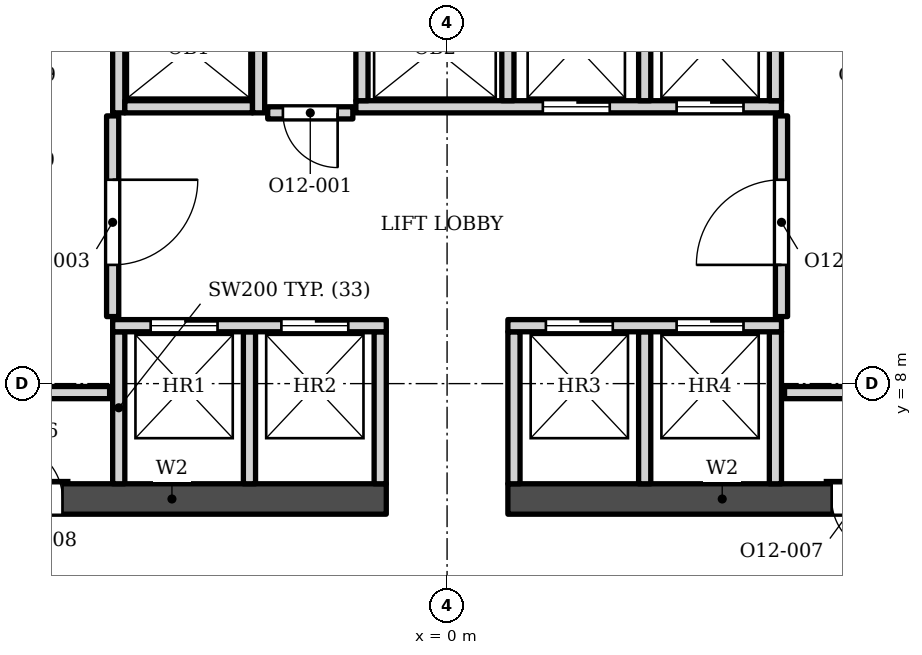
"""IFC4 building model, lengths in metres.
Left out: names, types, materials, properties, quantities, classifications, styles, units other than length and angle.
Written with IfcOpenShell. Run it as: python <this file> out.ifc"""

import sys

from ifc_helpers import new_model, si_unit, direction, frame, frame_2d, origin, place, context, subcontext, project, spatial, rectangle, extrude, element, fill, save


model = new_model("IFC4")
c1 = context("Model", 3, precision=1e-05, world=origin(), true_north=direction((0.0, 1.0)))
c2 = subcontext(c1, "Body", "Model", "MODEL_VIEW")
j1 = project(units=[si_unit("LENGTHUNIT", "METRE"), si_unit("PLANEANGLEUNIT", "RADIAN")], contexts=[c1])
p1 = place(None, origin())
s1 = spatial("IfcSite", under=j1, at=p1, CompositionType="ELEMENT")
p2 = place(p1, origin())
s2 = spatial("IfcBuilding", under=s1, at=p2, CompositionType="ELEMENT")
p3 = place(p2, frame((0.0, 0.0, 279.4)))
s3 = spatial("IfcBuildingStorey", under=s2, at=p3, CompositionType="ELEMENT", Elevation=279.4)
p4 = place(p3, frame((-8.05, 6.103, 0.0), z_axis=(0.0, 0.0, 1.0), x_axis=(1.0, 0.0, 0.0)))
e1 = element("IfcWall", 1, at=p4, inside=s3, PredefinedType="SHEAR", context=c2, shape_type="SweptSolid", body=[
    extrude(rectangle(XDim=7.05, YDim=0.5, at=frame_2d((3.525, 0.0))), origin(), (0.0, 0.0, 1.0), 3.9),
])
p5 = place(p4, frame((0.825, 0.0, 0.0)))
e2 = element("IfcOpeningElement", 2, at=p5, cuts=e1, PredefinedType="OPENING", context=c2, shape_type="SweptSolid", body=[
    extrude(rectangle(XDim=0.9, YDim=2.1, at=frame_2d((0.45, 1.05))), frame((0.0, 0.26, 0.0), z_axis=(0.0, -1.0, 0.0), x_axis=(1.0, 0.0, 0.0)), (0.0, 0.0, 1.0), 0.52),
])
p6 = place(p3, frame((1.0, 6.103, 0.0), z_axis=(0.0, 0.0, 1.0), x_axis=(1.0, 0.0, 0.0)))
e3 = element("IfcWall", 3, at=p6, inside=s3, PredefinedType="SHEAR", context=c2, shape_type="SweptSolid", body=[
    extrude(rectangle(XDim=7.05, YDim=0.5, at=frame_2d((3.525, 0.0))), origin(), (0.0, 0.0, 1.0), 3.9),
])
p7 = place(p6, frame((5.325, 0.0, 0.0)))
e4 = element("IfcOpeningElement", 4, at=p7, cuts=e3, PredefinedType="OPENING", context=c2, shape_type="SweptSolid", body=[
    extrude(rectangle(XDim=0.9, YDim=2.1, at=frame_2d((0.45, 1.05))), frame((0.0, 0.26, 0.0), z_axis=(0.0, -1.0, 0.0), x_axis=(1.0, 0.0, 0.0)), (0.0, 0.0, 1.0), 0.52),
])
for number, where, z_axis, x_axis in (
    (5, (-5.4, 6.353, 0.0), (0.0, 0.0, 1.0), (0.0, 1.0, 0.0)),
    (6, (-3.25, 6.353, 0.0), (0.0, 0.0, 1.0), (0.0, 1.0, 0.0)),
    (7, (-1.1, 6.353, 0.0), (0.0, 0.0, 1.0), (0.0, 1.0, 0.0)),
    (8, (1.1, 6.353, 0.0), (0.0, 0.0, 1.0), (0.0, 1.0, 0.0)),
    (9, (3.25, 6.353, 0.0), (0.0, 0.0, 1.0), (0.0, 1.0, 0.0)),
    (10, (5.4, 6.353, 0.0), (0.0, 0.0, 1.0), (0.0, 1.0, 0.0)),
    (11, (-8.05, 7.853, 0.0), (0.0, 0.0, 1.0), (1.0, 0.0, 0.0)),
    (12, (5.55, 7.853, 0.0), (0.0, 0.0, 1.0), (1.0, 0.0, 0.0)),
):
    element("IfcWall", number, at=place(p3, frame(where, z_axis=z_axis, x_axis=x_axis)), inside=s3, PredefinedType="SOLIDWALL", context=c2, shape_type="SweptSolid", body=[
        extrude(rectangle(XDim=2.5, YDim=0.2, at=frame_2d((1.25, 0.0))), origin(), (0.0, 0.0, 1.0), 3.73),
    ])
p8 = place(p3, frame((-5.5, 8.953, 0.0), z_axis=(0.0, 0.0, 1.0), x_axis=(1.0, 0.0, 0.0)))
e13 = element("IfcWall", 13, at=p8, inside=s3, PredefinedType="SOLIDWALL", context=c2, shape_type="SweptSolid", body=[
    extrude(rectangle(XDim=4.5, YDim=0.2, at=frame_2d((2.25, 0.0))), origin(), (0.0, 0.0, 1.0), 3.73),
])
p9 = place(p8, frame((0.625, 0.0, 0.0)))
e14 = element("IfcOpeningElement", 14, at=p9, cuts=e13, PredefinedType="OPENING", context=c2, shape_type="SweptSolid", body=[
    extrude(rectangle(XDim=1.1, YDim=2.1, at=frame_2d((0.55, 1.05))), frame((0.0, 0.11, 0.0), z_axis=(0.0, -1.0, 0.0), x_axis=(1.0, 0.0, 0.0)), (0.0, 0.0, 1.0), 0.22),
])
p10 = place(p8, frame((2.775, 0.0, 0.0)))
e15 = element("IfcOpeningElement", 15, at=p10, cuts=e13, PredefinedType="OPENING", context=c2, shape_type="SweptSolid", body=[
    extrude(rectangle(XDim=1.1, YDim=2.1, at=frame_2d((0.55, 1.05))), frame((0.0, 0.11, 0.0), z_axis=(0.0, -1.0, 0.0), x_axis=(1.0, 0.0, 0.0)), (0.0, 0.0, 1.0), 0.22),
])
p11 = place(p3, frame((1.0, 8.953, 0.0), z_axis=(0.0, 0.0, 1.0), x_axis=(1.0, 0.0, 0.0)))
e16 = element("IfcWall", 16, at=p11, inside=s3, PredefinedType="SOLIDWALL", context=c2, shape_type="SweptSolid", body=[
    extrude(rectangle(XDim=4.5, YDim=0.2, at=frame_2d((2.25, 0.0))), origin(), (0.0, 0.0, 1.0), 3.73),
])
p12 = place(p11, frame((0.625, 0.0, 0.0)))
e17 = element("IfcOpeningElement", 17, at=p12, cuts=e16, PredefinedType="OPENING", context=c2, shape_type="SweptSolid", body=[
    extrude(rectangle(XDim=1.1, YDim=2.1, at=frame_2d((0.55, 1.05))), frame((0.0, 0.11, 0.0), z_axis=(0.0, -1.0, 0.0), x_axis=(1.0, 0.0, 0.0)), (0.0, 0.0, 1.0), 0.22),
])
p13 = place(p11, frame((2.775, 0.0, 0.0)))
e18 = element("IfcOpeningElement", 18, at=p13, cuts=e16, PredefinedType="OPENING", context=c2, shape_type="SweptSolid", body=[
    extrude(rectangle(XDim=1.1, YDim=2.1, at=frame_2d((0.55, 1.05))), frame((0.0, 0.11, 0.0), z_axis=(0.0, -1.0, 0.0), x_axis=(1.0, 0.0, 0.0)), (0.0, 0.0, 1.0), 0.22),
])
p14 = place(p3, frame((-5.5, 9.103, 0.0), z_axis=(0.0, 0.0, 1.0), x_axis=(0.0, 1.0, 0.0)))
e19 = element("IfcWall", 19, at=p14, inside=s3, PredefinedType="SOLIDWALL", context=c2, shape_type="SweptSolid", body=[
    extrude(rectangle(XDim=3.3, YDim=0.2, at=frame_2d((1.65, 0.0))), origin(), (0.0, 0.0, 1.0), 3.73),
])
p15 = place(p14, frame((0.85, 0.0, 0.0)))
e20 = element("IfcOpeningElement", 20, at=p15, cuts=e19, PredefinedType="OPENING", context=c2, shape_type="SweptSolid", body=[
    extrude(rectangle(XDim=1.4, YDim=2.1, at=frame_2d((0.7, 1.05))), frame((0.0, 0.11, 0.0), z_axis=(0.0, -1.0, 0.0), x_axis=(1.0, 0.0, 0.0)), (0.0, 0.0, 1.0), 0.22),
])
p16 = place(p3, frame((5.5, 9.103, 0.0), z_axis=(0.0, 0.0, 1.0), x_axis=(0.0, 1.0, 0.0)))
e21 = element("IfcWall", 21, at=p16, inside=s3, PredefinedType="SOLIDWALL", context=c2, shape_type="SweptSolid", body=[
    extrude(rectangle(XDim=3.3, YDim=0.2, at=frame_2d((1.65, 0.0))), origin(), (0.0, 0.0, 1.0), 3.73),
])
p17 = place(p16, frame((0.85, 0.0, 0.0)))
e22 = element("IfcOpeningElement", 22, at=p17, cuts=e21, PredefinedType="OPENING", context=c2, shape_type="SweptSolid", body=[
    extrude(rectangle(XDim=1.4, YDim=2.1, at=frame_2d((0.7, 1.05))), frame((0.0, 0.11, 0.0), z_axis=(0.0, -1.0, 0.0), x_axis=(1.0, 0.0, 0.0)), (0.0, 0.0, 1.0), 0.22),
])
p18 = place(p3, frame((-2.95, 12.453, 0.0), z_axis=(0.0, 0.0, 1.0), x_axis=(1.0, 0.0, 0.0)))
e23 = element("IfcWall", 23, at=p18, inside=s3, PredefinedType="SOLIDWALL", context=c2, shape_type="SweptSolid", body=[
    extrude(rectangle(XDim=1.4, YDim=0.2, at=frame_2d((0.7, 0.0))), origin(), (0.0, 0.0, 1.0), 3.73),
])
p19 = place(p18, frame((0.25, 0.0, 0.0)))
e24 = element("IfcOpeningElement", 24, at=p19, cuts=e23, PredefinedType="OPENING", context=c2, shape_type="SweptSolid", body=[
    extrude(rectangle(XDim=0.9, YDim=2.1, at=frame_2d((0.45, 1.05))), frame((0.0, 0.11, 0.0), z_axis=(0.0, -1.0, 0.0), x_axis=(1.0, 0.0, 0.0)), (0.0, 0.0, 1.0), 0.22),
])
p20 = place(p3, frame((-5.4, 12.453, 0.0), z_axis=(0.0, 0.0, 1.0), x_axis=(0.0, 1.0, 0.0)))
e25 = element("IfcWall", 25, at=p20, inside=s3, PredefinedType="SOLIDWALL", context=c2, shape_type="SweptSolid", body=[
    extrude(rectangle(XDim=3.0, YDim=0.2, at=frame_2d((1.5, 0.0))), origin(), (0.0, 0.0, 1.0), 3.73),
])
p21 = place(p3, frame((-5.3, 12.552, 0.0), z_axis=(0.0, 0.0, 1.0), x_axis=(1.0, 0.0, 0.0)))
e26 = element("IfcWall", 26, at=p21, inside=s3, PredefinedType="SOLIDWALL", context=c2, shape_type="SweptSolid", body=[
    extrude(rectangle(XDim=2.1, YDim=0.2, at=frame_2d((1.05, 0.0))), origin(), (0.0, 0.0, 1.0), 3.73),
])
p22 = place(p3, frame((-3.1, 12.453, 0.0), z_axis=(0.0, 0.0, 1.0), x_axis=(0.0, 1.0, 0.0)))
e27 = element("IfcWall", 27, at=p22, inside=s3, PredefinedType="SOLIDWALL", context=c2, shape_type="SweptSolid", body=[
    extrude(rectangle(XDim=3.0, YDim=0.2, at=frame_2d((1.5, 0.0))), origin(), (0.0, 0.0, 1.0), 3.73),
])
p23 = place(p3, frame((-1.5, 12.552, 0.0), z_axis=(0.0, 0.0, 1.0), x_axis=(1.0, 0.0, 0.0)))
e28 = element("IfcWall", 28, at=p23, inside=s3, PredefinedType="SOLIDWALL", context=c2, shape_type="SweptSolid", body=[
    extrude(rectangle(XDim=7.0, YDim=0.2, at=frame_2d((3.5, 0.0))), origin(), (0.0, 0.0, 1.0), 3.73),
])
p24 = place(p23, frame((3.075, 0.0, 0.0)))
e29 = element("IfcOpeningElement", 29, at=p24, cuts=e28, PredefinedType="OPENING", context=c2, shape_type="SweptSolid", body=[
    extrude(rectangle(XDim=1.1, YDim=2.1, at=frame_2d((0.55, 1.05))), frame((0.0, 0.11, 0.0), z_axis=(0.0, -1.0, 0.0), x_axis=(1.0, 0.0, 0.0)), (0.0, 0.0, 1.0), 0.22),
])
p25 = place(p23, frame((5.275, 0.0, 0.0)))
e30 = element("IfcOpeningElement", 30, at=p25, cuts=e28, PredefinedType="OPENING", context=c2, shape_type="SweptSolid", body=[
    extrude(rectangle(XDim=1.1, YDim=2.1, at=frame_2d((0.55, 1.05))), frame((0.0, 0.11, 0.0), z_axis=(0.0, -1.0, 0.0), x_axis=(1.0, 0.0, 0.0)), (0.0, 0.0, 1.0), 0.22),
])
for number, where, z_axis, x_axis in (
    (31, (-1.4, 12.653, 0.0), (0.0, 0.0, 1.0), (0.0, 1.0, 0.0)),
    (32, (1.0, 12.653, 0.0), (0.0, 0.0, 1.0), (0.0, 1.0, 0.0)),
    (33, (3.25, 12.653, 0.0), (0.0, 0.0, 1.0), (0.0, 1.0, 0.0)),
):
    element("IfcWall", number, at=place(p3, frame(where, z_axis=z_axis, x_axis=x_axis)), inside=s3, PredefinedType="SOLIDWALL", context=c2, shape_type="SweptSolid", body=[
        extrude(rectangle(XDim=2.6, YDim=0.2, at=frame_2d((1.3, 0.0))), origin(), (0.0, 0.0, 1.0), 3.73),
    ])
p26 = place(p3, frame((5.4, 12.653, 0.0), z_axis=(0.0, 0.0, 1.0), x_axis=(0.0, 1.0, 0.0)))
e34 = element("IfcWall", 34, at=p26, inside=s3, PredefinedType="SOLIDWALL", context=c2, shape_type="SweptSolid", body=[
    extrude(rectangle(XDim=1.6, YDim=0.2, at=frame_2d((0.8, 0.0))), origin(), (0.0, 0.0, 1.0), 3.73),
])
p27 = place(p9, origin())
e35 = element("IfcDoor", 35, at=p27, inside=s3, OperationType="DOUBLE_DOOR_SLIDING", PredefinedType="DOOR", context=c2, shape_type="SweptSolid", body=[
    extrude(rectangle(XDim=1.1, YDim=2.1, at=frame_2d((0.55, 1.05))), frame((0.0, 0.025, 0.0), z_axis=(0.0, -1.0, 0.0), x_axis=(1.0, 0.0, 0.0)), (0.0, 0.0, 1.0), 0.05),
])
fill(e14, e35)
p28 = place(p10, origin())
e36 = element("IfcDoor", 36, at=p28, inside=s3, OperationType="DOUBLE_DOOR_SLIDING", PredefinedType="DOOR", context=c2, shape_type="SweptSolid", body=[
    extrude(rectangle(XDim=1.1, YDim=2.1, at=frame_2d((0.55, 1.05))), frame((0.0, 0.025, 0.0), z_axis=(0.0, -1.0, 0.0), x_axis=(1.0, 0.0, 0.0)), (0.0, 0.0, 1.0), 0.05),
])
fill(e15, e36)
p29 = place(p12, origin())
e37 = element("IfcDoor", 37, at=p29, inside=s3, OperationType="DOUBLE_DOOR_SLIDING", PredefinedType="DOOR", context=c2, shape_type="SweptSolid", body=[
    extrude(rectangle(XDim=1.1, YDim=2.1, at=frame_2d((0.55, 1.05))), frame((0.0, 0.025, 0.0), z_axis=(0.0, -1.0, 0.0), x_axis=(1.0, 0.0, 0.0)), (0.0, 0.0, 1.0), 0.05),
])
fill(e17, e37)
p30 = place(p13, origin())
e38 = element("IfcDoor", 38, at=p30, inside=s3, OperationType="DOUBLE_DOOR_SLIDING", PredefinedType="DOOR", context=c2, shape_type="SweptSolid", body=[
    extrude(rectangle(XDim=1.1, YDim=2.1, at=frame_2d((0.55, 1.05))), frame((0.0, 0.025, 0.0), z_axis=(0.0, -1.0, 0.0), x_axis=(1.0, 0.0, 0.0)), (0.0, 0.0, 1.0), 0.05),
])
fill(e18, e38)
p31 = place(p24, origin())
e39 = element("IfcDoor", 39, at=p31, inside=s3, OperationType="DOUBLE_DOOR_SLIDING", PredefinedType="DOOR", context=c2, shape_type="SweptSolid", body=[
    extrude(rectangle(XDim=1.1, YDim=2.1, at=frame_2d((0.55, 1.05))), frame((0.0, 0.025, 0.0), z_axis=(0.0, -1.0, 0.0), x_axis=(1.0, 0.0, 0.0)), (0.0, 0.0, 1.0), 0.05),
])
fill(e29, e39)
p32 = place(p25, origin())
e40 = element("IfcDoor", 40, at=p32, inside=s3, OperationType="DOUBLE_DOOR_SLIDING", PredefinedType="DOOR", context=c2, shape_type="SweptSolid", body=[
    extrude(rectangle(XDim=1.1, YDim=2.1, at=frame_2d((0.55, 1.05))), frame((0.0, 0.025, 0.0), z_axis=(0.0, -1.0, 0.0), x_axis=(1.0, 0.0, 0.0)), (0.0, 0.0, 1.0), 0.05),
])
fill(e30, e40)
p33 = place(p19, origin())
e41 = element("IfcDoor", 41, at=p33, inside=s3, OperationType="SINGLE_SWING_RIGHT", PredefinedType="DOOR", context=c2, shape_type="SweptSolid", body=[
    extrude(rectangle(XDim=0.9, YDim=2.1, at=frame_2d((0.45, 1.05))), frame((0.0, 0.025, 0.0), z_axis=(0.0, -1.0, 0.0), x_axis=(1.0, 0.0, 0.0)), (0.0, 0.0, 1.0), 0.05),
])
fill(e24, e41)
p34 = place(p15, origin())
e42 = element("IfcDoor", 42, at=p34, inside=s3, OperationType="SINGLE_SWING_RIGHT", PredefinedType="DOOR", context=c2, shape_type="SweptSolid", body=[
    extrude(rectangle(XDim=1.4, YDim=2.1, at=frame_2d((0.7, 1.05))), frame((0.0, 0.025, 0.0), z_axis=(0.0, -1.0, 0.0), x_axis=(1.0, 0.0, 0.0)), (0.0, 0.0, 1.0), 0.05),
])
fill(e20, e42)
p35 = place(p17, origin())
e43 = element("IfcDoor", 43, at=p35, inside=s3, OperationType="SINGLE_SWING_LEFT", PredefinedType="DOOR", context=c2, shape_type="SweptSolid", body=[
    extrude(rectangle(XDim=1.4, YDim=2.1, at=frame_2d((0.7, 1.05))), frame((0.0, 0.025, 0.0), z_axis=(0.0, -1.0, 0.0), x_axis=(1.0, 0.0, 0.0)), (0.0, 0.0, 1.0), 0.05),
])
fill(e22, e43)
p36 = place(p5, origin())
e44 = element("IfcDoor", 44, at=p36, inside=s3, OperationType="SINGLE_SWING_LEFT", PredefinedType="DOOR", context=c2, shape_type="SweptSolid", body=[
    extrude(rectangle(XDim=0.9, YDim=2.1, at=frame_2d((0.45, 1.05))), frame((0.0, 0.025, 0.0), z_axis=(0.0, -1.0, 0.0), x_axis=(1.0, 0.0, 0.0)), (0.0, 0.0, 1.0), 0.05),
])
fill(e2, e44)
p37 = place(p7, origin())
e45 = element("IfcDoor", 45, at=p37, inside=s3, OperationType="SINGLE_SWING_RIGHT", PredefinedType="DOOR", context=c2, shape_type="SweptSolid", body=[
    extrude(rectangle(XDim=0.9, YDim=2.1, at=frame_2d((0.45, 1.05))), frame((0.0, 0.025, 0.0), z_axis=(0.0, -1.0, 0.0), x_axis=(1.0, 0.0, 0.0)), (0.0, 0.0, 1.0), 0.05),
])
fill(e4, e45)
save(model, sys.argv[1])
